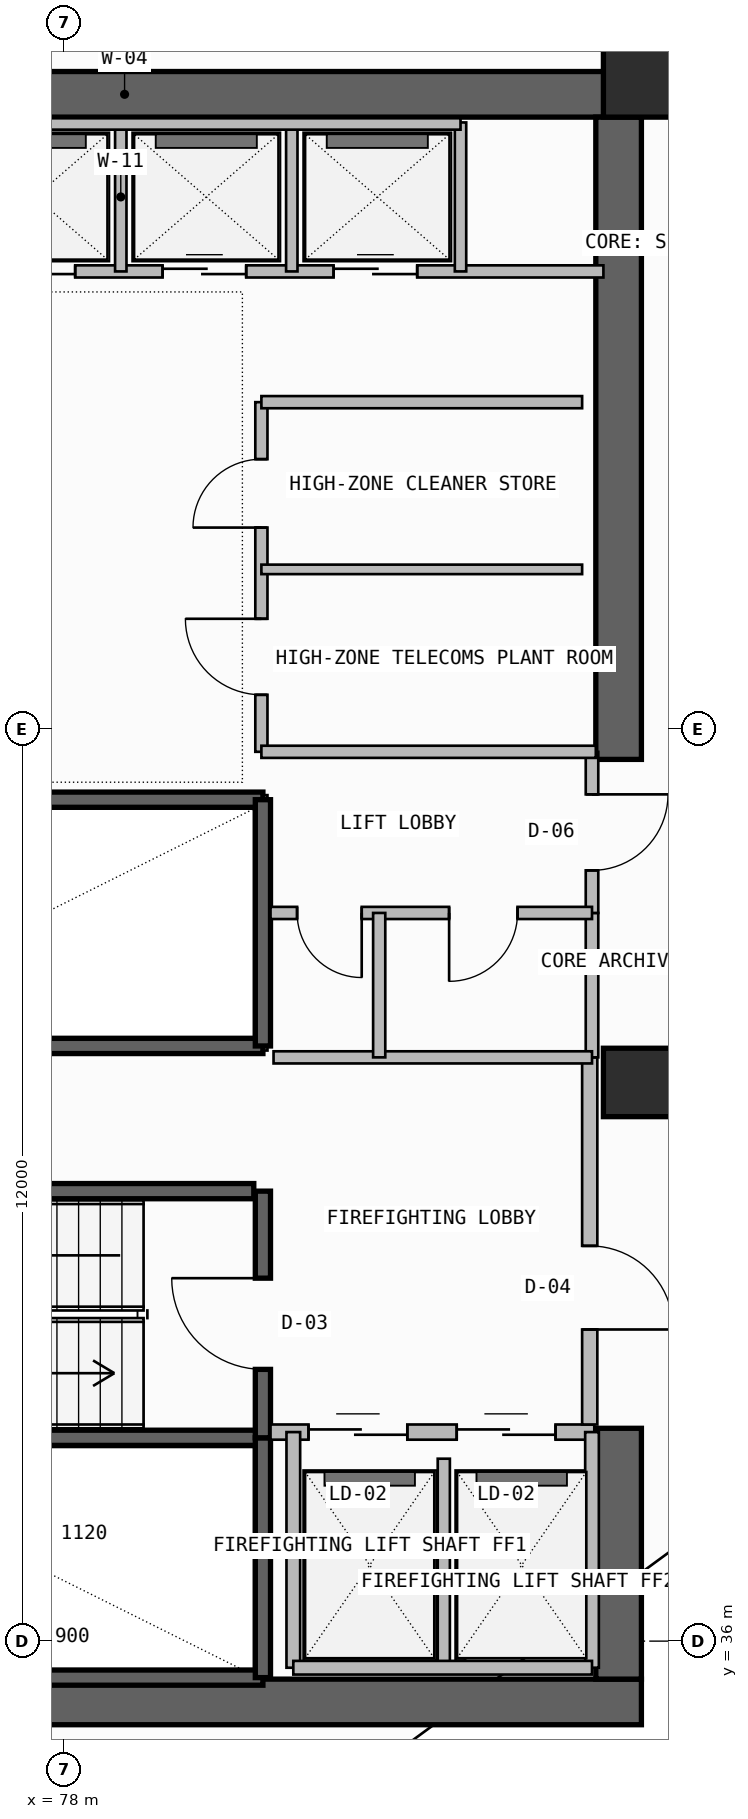
"""IFC4 building model, lengths in metres.
Left out: names, types, materials, properties, quantities, classifications, styles, units other than length and angle.
Written with IfcOpenShell. Run it as: python <this file> out.ifc"""

import sys

from ifc_helpers import new_model, si_unit, direction, frame, frame_2d, origin, origin_2d, place, context, subcontext, project, spatial, rectangle, extrude, element, fill, save


model = new_model("IFC4")
c1 = context("Model", 3, precision=1e-05, world=origin(), true_north=direction((0.0, 1.0)))
c2 = subcontext(c1, "Body", "Model", "MODEL_VIEW")
j1 = project(units=[si_unit("LENGTHUNIT", "METRE"), si_unit("PLANEANGLEUNIT", "RADIAN")], contexts=[c1])
p1 = place(None, origin())
s1 = spatial("IfcSite", under=j1, at=p1, CompositionType="ELEMENT")
p2 = place(p1, origin())
s2 = spatial("IfcBuilding", under=s1, at=p2, CompositionType="ELEMENT")
p3 = place(p2, frame((0.0, 0.0, 236.1)))
s3 = spatial("IfcBuildingStorey", under=s2, at=p3, CompositionType="ELEMENT", Elevation=236.1)
p4 = place(p3, frame((72.3, 35.2, -0.26), z_axis=(0.0, 0.0, 1.0), x_axis=(1.0, 0.0, 0.0)))
e1 = element("IfcWall", 1, at=p4, inside=s3, PredefinedType="SHEAR", context=c2, shape_type="SweptSolid", body=[
    extrude(rectangle(XDim=13.3, YDim=0.6, at=frame_2d((6.65, 0.0))), origin(), (0.0, 0.0, 1.0), 3.52),
])
p5 = place(p3, frame((85.3, 35.5, -0.26), z_axis=(0.0, 0.0, 1.0), x_axis=(0.0, 1.0, 0.0)))
e2 = element("IfcWall", 2, at=p5, inside=s3, PredefinedType="SHEAR", context=c2, shape_type="SweptSolid", body=[
    extrude(rectangle(XDim=3.3, YDim=0.6, at=frame_2d((1.65, 0.0))), origin(), (0.0, 0.0, 1.0), 3.52),
])
p6 = place(p3, frame((72.0, 56.35, -0.26), z_axis=(0.0, 0.0, 1.0), x_axis=(1.0, 0.0, 0.0)))
e3 = element("IfcWall", 3, at=p6, inside=s3, PredefinedType="SHEAR", context=c2, shape_type="SweptSolid", body=[
    extrude(rectangle(XDim=13.6, YDim=0.6, at=frame_2d((6.8, 0.0))), origin(), (0.0, 0.0, 1.0), 3.52),
])
p7 = place(p3, frame((85.3, 47.6, -0.26), z_axis=(0.0, 0.0, 1.0), x_axis=(0.0, 1.0, 0.0)))
e4 = element("IfcWall", 4, at=p7, inside=s3, PredefinedType="SHEAR", context=c2, shape_type="SweptSolid", body=[
    extrude(rectangle(XDim=8.45, YDim=0.6, at=frame_2d((4.225, 0.0))), origin(), (0.0, 0.0, 1.0), 3.52),
])
for number, where, z_axis, x_axis in (
    (5, (85.55, 43.35, 0.0), (0.0, 0.0, 1.0), (1.0, 0.0, 0.0)),
    (6, (85.55, 56.5, 0.0), (0.0, 0.0, 1.0), (1.0, 0.0, 0.0)),
):
    element("IfcColumn", number, at=place(p3, frame(where, z_axis=z_axis, x_axis=x_axis)), inside=s3, PredefinedType="COLUMN", context=c2, shape_type="SweptSolid", body=[
        extrude(rectangle(XDim=0.9, YDim=0.9, at=origin_2d()), origin(), (0.0, 0.0, 1.0), 3.52),
    ])
for number, where, z_axis, x_axis in (
    (7, (72.92, 35.52, -0.26), (0.0, 0.0, 1.0), (1.0, 0.0, 0.0)),
    (8, (72.92, 38.675, -0.26), (0.0, 0.0, 1.0), (1.0, 0.0, 0.0)),
):
    element("IfcWall", number, at=place(p3, frame(where, z_axis=z_axis, x_axis=x_axis)), inside=s3, PredefinedType="SOLIDWALL", context=c2, shape_type="SweptSolid", body=[
        extrude(rectangle(XDim=7.7, YDim=0.2, at=frame_2d((3.85, 0.0))), origin(), (0.0, 0.0, 1.0), 3.52),
    ])
p8 = place(p3, frame((80.62, 35.52, -0.26), z_axis=(0.0, 0.0, 1.0), x_axis=(0.0, 1.0, 0.0)))
e9 = element("IfcWall", 9, at=p8, inside=s3, PredefinedType="SOLIDWALL", context=c2, shape_type="SweptSolid", body=[
    extrude(rectangle(XDim=3.155, YDim=0.2, at=frame_2d((1.578, 0.0))), origin(), (0.0, 0.0, 1.0), 3.52),
])
p9 = place(p3, frame((80.62, 38.675, -0.26), z_axis=(0.0, 0.0, 1.0), x_axis=(0.0, 1.0, 0.0)))
e10 = element("IfcWall", 10, at=p9, inside=s3, PredefinedType="SOLIDWALL", context=c2, shape_type="SweptSolid", body=[
    extrude(rectangle(XDim=3.245, YDim=0.2, at=frame_2d((1.623, 0.0))), origin(), (0.0, 0.0, 1.0), 3.52),
])
p10 = place(p9, frame((0.9, 0.0, 0.26)))
e11 = element("IfcOpeningElement", 11, at=p10, cuts=e10, PredefinedType="OPENING", context=c2, shape_type="SweptSolid", body=[
    extrude(rectangle(XDim=1.2, YDim=2.2, at=frame_2d((0.6, 1.1))), frame((0.0, 0.11, 0.0), z_axis=(0.0, -1.0, 0.0), x_axis=(1.0, 0.0, 0.0)), (0.0, 0.0, 1.0), 0.22),
])
p11 = place(p3, frame((80.72, 38.75, 0.0), z_axis=(0.0, 0.0, 1.0), x_axis=(1.0, 0.0, 0.0)))
e12 = element("IfcWall", 12, at=p11, inside=s3, PredefinedType="SOLIDWALL", context=c2, shape_type="SweptSolid", body=[
    extrude(rectangle(XDim=4.26, YDim=0.2, at=frame_2d((2.13, 0.0))), origin(), (0.0, 0.0, 1.0), 3.26),
])
p12 = place(p11, frame((0.5, 0.0, 0.0)))
e13 = element("IfcOpeningElement", 13, at=p12, cuts=e12, PredefinedType="OPENING", context=c2, shape_type="SweptSolid", body=[
    extrude(rectangle(XDim=1.3, YDim=2.3, at=frame_2d((0.65, 1.15))), frame((0.0, 0.11, 0.0), z_axis=(0.0, -1.0, 0.0), x_axis=(1.0, 0.0, 0.0)), (0.0, 0.0, 1.0), 0.22),
])
p13 = place(p11, frame((2.45, 0.0, 0.0)))
e14 = element("IfcOpeningElement", 14, at=p13, cuts=e12, PredefinedType="OPENING", context=c2, shape_type="SweptSolid", body=[
    extrude(rectangle(XDim=1.3, YDim=2.3, at=frame_2d((0.65, 1.15))), frame((0.0, 0.11, 0.0), z_axis=(0.0, -1.0, 0.0), x_axis=(1.0, 0.0, 0.0)), (0.0, 0.0, 1.0), 0.22),
])
p14 = place(p3, frame((83.0, 35.65, 0.0), z_axis=(0.0, 0.0, 1.0), x_axis=(0.0, 1.0, 0.0)))
e15 = element("IfcWall", 15, at=p14, inside=s3, PredefinedType="PLUMBINGWALL", context=c2, shape_type="SweptSolid", body=[
    extrude(rectangle(XDim=2.75, YDim=0.16, at=frame_2d((1.375, 0.0))), origin(), (0.0, 0.0, 1.0), 3.26),
])
for number, where, z_axis, x_axis in (
    (16, (84.95, 35.65, 0.0), (0.0, 0.0, 1.0), (0.0, 1.0, 0.0)),
    (17, (81.02, 35.65, 0.0), (0.0, 0.0, 1.0), (0.0, 1.0, 0.0)),
):
    element("IfcWall", number, at=place(p3, frame(where, z_axis=z_axis, x_axis=x_axis)), inside=s3, PredefinedType="SOLIDWALL", context=c2, shape_type="SweptSolid", body=[
        extrude(rectangle(XDim=3.1, YDim=0.18, at=frame_2d((1.55, 0.0))), origin(), (0.0, 0.0, 1.0), 3.26),
    ])
p15 = place(p3, frame((81.02, 35.65, 0.0), z_axis=(0.0, 0.0, 1.0), x_axis=(1.0, 0.0, 0.0)))
e18 = element("IfcWall", 18, at=p15, inside=s3, PredefinedType="SOLIDWALL", context=c2, shape_type="SweptSolid", body=[
    extrude(rectangle(XDim=3.93, YDim=0.18, at=frame_2d((1.965, 0.0))), origin(), (0.0, 0.0, 1.0), 3.26),
])
p16 = place(p3, frame((84.92, 38.85, 0.0), z_axis=(0.0, 0.0, 1.0), x_axis=(0.0, 1.0, 0.0)))
e19 = element("IfcWall", 19, at=p16, inside=s3, PredefinedType="SOLIDWALL", context=c2, shape_type="SweptSolid", body=[
    extrude(rectangle(XDim=4.83, YDim=0.2, at=frame_2d((2.415, 0.0))), origin(), (0.0, 0.0, 1.0), 3.26),
])
p17 = place(p16, frame((1.25, 0.0, 0.0)))
e20 = element("IfcOpeningElement", 20, at=p17, cuts=e19, PredefinedType="OPENING", context=c2, shape_type="SweptSolid", body=[
    extrude(rectangle(XDim=1.1, YDim=2.2, at=frame_2d((0.55, 1.1))), frame((0.0, 0.11, 0.0), z_axis=(0.0, -1.0, 0.0), x_axis=(1.0, 0.0, 0.0)), (0.0, 0.0, 1.0), 0.22),
])
p18 = place(p3, frame((72.92, 41.92, -0.26), z_axis=(0.0, 0.0, 1.0), x_axis=(1.0, 0.0, 0.0)))
e21 = element("IfcWall", 21, at=p18, inside=s3, PredefinedType="SOLIDWALL", context=c2, shape_type="SweptSolid", body=[
    extrude(rectangle(XDim=7.58, YDim=0.2, at=frame_2d((3.79, 0.0))), origin(), (0.0, 0.0, 1.0), 3.52),
])
for number, where, z_axis, x_axis in (
    (22, (72.92, 43.83, -0.26), (0.0, 0.0, 1.0), (1.0, 0.0, 0.0)),
    (23, (72.92, 47.07, -0.26), (0.0, 0.0, 1.0), (1.0, 0.0, 0.0)),
):
    element("IfcWall", number, at=place(p3, frame(where, z_axis=z_axis, x_axis=x_axis)), inside=s3, PredefinedType="SOLIDWALL", context=c2, shape_type="SweptSolid", body=[
        extrude(rectangle(XDim=7.7, YDim=0.2, at=frame_2d((3.85, 0.0))), origin(), (0.0, 0.0, 1.0), 3.52),
    ])
p19 = place(p3, frame((80.62, 43.83, -0.26), z_axis=(0.0, 0.0, 1.0), x_axis=(0.0, 1.0, 0.0)))
e24 = element("IfcWall", 24, at=p19, inside=s3, PredefinedType="SOLIDWALL", context=c2, shape_type="SweptSolid", body=[
    extrude(rectangle(XDim=3.24, YDim=0.2, at=frame_2d((1.62, 0.0))), origin(), (0.0, 0.0, 1.0), 3.52),
])
p20 = place(p3, frame((84.95, 43.68, 0.0), z_axis=(0.0, 0.0, 1.0), x_axis=(0.0, 1.0, 0.0)))
e25 = element("IfcWall", 25, at=p20, inside=s3, PredefinedType="PLUMBINGWALL", context=c2, shape_type="SweptSolid", body=[
    extrude(rectangle(XDim=1.9, YDim=0.165, at=frame_2d((0.95, 0.0))), origin(), (0.0, 0.0, 1.0), 3.26),
])
p21 = place(p3, frame((84.95, 45.58, 0.0), z_axis=(0.0, 0.0, 1.0), x_axis=(0.0, 1.0, 0.0)))
e26 = element("IfcWall", 26, at=p21, inside=s3, PredefinedType="PARTITIONING", context=c2, shape_type="SweptSolid", body=[
    extrude(rectangle(XDim=2.12, YDim=0.165, at=frame_2d((1.06, 0.0))), origin(), (0.0, 0.0, 1.0), 3.26),
])
p22 = place(p21, frame((0.56, 0.0, 0.0)))
e27 = element("IfcOpeningElement", 27, at=p22, cuts=e26, PredefinedType="OPENING", context=c2, shape_type="SweptSolid", body=[
    extrude(rectangle(XDim=1.0, YDim=2.2, at=frame_2d((0.5, 1.1))), frame((0.0, 0.093, 0.0), z_axis=(0.0, -1.0, 0.0), x_axis=(1.0, 0.0, 0.0)), (0.0, 0.0, 1.0), 0.185),
])
p23 = place(p3, frame((80.72, 45.58, 0.0), z_axis=(0.0, 0.0, 1.0), x_axis=(1.0, 0.0, 0.0)))
e28 = element("IfcWall", 28, at=p23, inside=s3, PredefinedType="PLUMBINGWALL", context=c2, shape_type="SweptSolid", body=[
    extrude(rectangle(XDim=4.23, YDim=0.16, at=frame_2d((2.115, 0.0))), origin(), (0.0, 0.0, 1.0), 3.26),
])
p24 = place(p23, frame((0.35, 0.0, 0.0)))
e29 = element("IfcOpeningElement", 29, at=p24, cuts=e28, PredefinedType="OPENING", context=c2, shape_type="SweptSolid", body=[
    extrude(rectangle(XDim=0.85, YDim=2.05, at=frame_2d((0.425, 1.025))), frame((0.0, 0.09, 0.0), z_axis=(0.0, -1.0, 0.0), x_axis=(1.0, 0.0, 0.0)), (0.0, 0.0, 1.0), 0.18),
])
p25 = place(p23, frame((2.35, 0.0, 0.0)))
e30 = element("IfcOpeningElement", 30, at=p25, cuts=e28, PredefinedType="OPENING", context=c2, shape_type="SweptSolid", body=[
    extrude(rectangle(XDim=0.9, YDim=2.1, at=frame_2d((0.45, 1.05))), frame((0.0, 0.09, 0.0), z_axis=(0.0, -1.0, 0.0), x_axis=(1.0, 0.0, 0.0)), (0.0, 0.0, 1.0), 0.18),
])
p26 = place(p3, frame((80.76, 43.68, 0.0), z_axis=(0.0, 0.0, 1.0), x_axis=(1.0, 0.0, 0.0)))
e31 = element("IfcWall", 31, at=p26, inside=s3, PredefinedType="PLUMBINGWALL", context=c2, shape_type="SweptSolid", body=[
    extrude(rectangle(XDim=4.19, YDim=0.16, at=frame_2d((2.095, 0.0))), origin(), (0.0, 0.0, 1.0), 3.26),
])
p27 = place(p3, frame((82.15, 43.68, 0.0), z_axis=(0.0, 0.0, 1.0), x_axis=(0.0, 1.0, 0.0)))
e32 = element("IfcWall", 32, at=p27, inside=s3, PredefinedType="PLUMBINGWALL", context=c2, shape_type="SweptSolid", body=[
    extrude(rectangle(XDim=1.9, YDim=0.16, at=frame_2d((0.95, 0.0))), origin(), (0.0, 0.0, 1.0), 3.26),
])
p28 = place(p3, frame((80.6, 47.7, 0.0), z_axis=(0.0, 0.0, 1.0), x_axis=(0.0, 1.0, 0.0)))
e33 = element("IfcWall", 33, at=p28, inside=s3, PredefinedType="SOLIDWALL", context=c2, shape_type="SweptSolid", body=[
    extrude(rectangle(XDim=4.6, YDim=0.16, at=frame_2d((2.3, 0.0))), origin(), (0.0, 0.0, 1.0), 3.26),
])
p29 = place(p28, frame((0.75, 0.0, 0.0)))
e34 = element("IfcOpeningElement", 34, at=p29, cuts=e33, PredefinedType="OPENING", context=c2, shape_type="SweptSolid", body=[
    extrude(rectangle(XDim=1.0, YDim=2.2, at=frame_2d((0.5, 1.1))), frame((0.0, 0.09, 0.0), z_axis=(0.0, -1.0, 0.0), x_axis=(1.0, 0.0, 0.0)), (0.0, 0.0, 1.0), 0.18),
])
p30 = place(p28, frame((2.95, 0.0, 0.0)))
e35 = element("IfcOpeningElement", 35, at=p30, cuts=e33, PredefinedType="OPENING", context=c2, shape_type="SweptSolid", body=[
    extrude(rectangle(XDim=0.9, YDim=2.1, at=frame_2d((0.45, 1.05))), frame((0.0, 0.09, 0.0), z_axis=(0.0, -1.0, 0.0), x_axis=(1.0, 0.0, 0.0)), (0.0, 0.0, 1.0), 0.18),
])
p31 = place(p3, frame((80.6, 47.7, 0.0), z_axis=(0.0, 0.0, 1.0), x_axis=(1.0, 0.0, 0.0)))
e36 = element("IfcWall", 36, at=p31, inside=s3, PredefinedType="SOLIDWALL", context=c2, shape_type="SweptSolid", body=[
    extrude(rectangle(XDim=4.4, YDim=0.16, at=frame_2d((2.2, 0.0))), origin(), (0.0, 0.0, 1.0), 3.26),
])
p32 = place(p3, frame((80.6, 52.3, 0.0), z_axis=(0.0, 0.0, 1.0), x_axis=(1.0, 0.0, 0.0)))
e37 = element("IfcWall", 37, at=p32, inside=s3, PredefinedType="SOLIDWALL", context=c2, shape_type="SweptSolid", body=[
    extrude(rectangle(XDim=4.22, YDim=0.16, at=frame_2d((2.11, 0.0))), origin(), (0.0, 0.0, 1.0), 3.26),
])
p33 = place(p3, frame((80.6, 50.1, 0.0), z_axis=(0.0, 0.0, 1.0), x_axis=(1.0, 0.0, 0.0)))
e38 = element("IfcWall", 38, at=p33, inside=s3, PredefinedType="PARTITIONING", context=c2, shape_type="SweptSolid", body=[
    extrude(rectangle(XDim=4.22, YDim=0.125, at=frame_2d((2.11, 0.0))), origin(), (0.0, 0.0, 1.0), 3.26),
])
p34 = place(p3, frame((73.02, 54.02, 0.0), z_axis=(0.0, 0.0, 1.0), x_axis=(1.0, 0.0, 0.0)))
e39 = element("IfcWall", 39, at=p34, inside=s3, PredefinedType="SOLIDWALL", context=c2, shape_type="SweptSolid", body=[
    extrude(rectangle(XDim=12.08, YDim=0.16, at=frame_2d((6.04, 0.0))), origin(), (0.0, 0.0, 1.0), 3.26),
])
p35 = place(p34, frame((4.03, 0.0, 0.0)))
e40 = element("IfcOpeningElement", 40, at=p35, cuts=e39, PredefinedType="OPENING", context=c2, shape_type="SweptSolid", body=[
    extrude(rectangle(XDim=1.1, YDim=2.25, at=frame_2d((0.55, 1.125))), frame((0.0, 0.09, 0.0), z_axis=(0.0, -1.0, 0.0), x_axis=(1.0, 0.0, 0.0)), (0.0, 0.0, 1.0), 0.18),
])
p36 = place(p34, frame((6.28, 0.0, 0.0)))
e41 = element("IfcOpeningElement", 41, at=p36, cuts=e39, PredefinedType="OPENING", context=c2, shape_type="SweptSolid", body=[
    extrude(rectangle(XDim=1.1, YDim=2.25, at=frame_2d((0.55, 1.125))), frame((0.0, 0.09, 0.0), z_axis=(0.0, -1.0, 0.0), x_axis=(1.0, 0.0, 0.0)), (0.0, 0.0, 1.0), 0.18),
])
p37 = place(p34, frame((8.53, 0.0, 0.0)))
e42 = element("IfcOpeningElement", 42, at=p37, cuts=e39, PredefinedType="OPENING", context=c2, shape_type="SweptSolid", body=[
    extrude(rectangle(XDim=1.1, YDim=2.25, at=frame_2d((0.55, 1.125))), frame((0.0, 0.09, 0.0), z_axis=(0.0, -1.0, 0.0), x_axis=(1.0, 0.0, 0.0)), (0.0, 0.0, 1.0), 0.18),
])
for number, where, z_axis, x_axis in (
    (43, (78.75, 54.02, 0.0), (0.0, 0.0, 1.0), (0.0, 1.0, 0.0)),
    (44, (81.0, 54.02, 0.0), (0.0, 0.0, 1.0), (0.0, 1.0, 0.0)),
):
    element("IfcWall", number, at=place(p3, frame(where, z_axis=z_axis, x_axis=x_axis)), inside=s3, PredefinedType="PLUMBINGWALL", context=c2, shape_type="SweptSolid", body=[
        extrude(rectangle(XDim=1.96, YDim=0.15, at=frame_2d((0.98, 0.0))), origin(), (0.0, 0.0, 1.0), 3.26),
    ])
p38 = place(p3, frame((83.22, 54.02, 0.0), z_axis=(0.0, 0.0, 1.0), x_axis=(0.0, 1.0, 0.0)))
e45 = element("IfcWall", 45, at=p38, inside=s3, PredefinedType="SOLIDWALL", context=c2, shape_type="SweptSolid", body=[
    extrude(rectangle(XDim=1.96, YDim=0.15, at=frame_2d((0.98, 0.0))), origin(), (0.0, 0.0, 1.0), 3.26),
])
p39 = place(p3, frame((76.52, 55.96, 0.0), z_axis=(0.0, 0.0, 1.0), x_axis=(1.0, 0.0, 0.0)))
e46 = element("IfcWall", 46, at=p39, inside=s3, PredefinedType="SOLIDWALL", context=c2, shape_type="SweptSolid", body=[
    extrude(rectangle(XDim=6.7, YDim=0.15, at=frame_2d((3.35, 0.0))), origin(), (0.0, 0.0, 1.0), 3.26),
])
p40 = place(p10, origin())
e47 = element("IfcDoor", 47, at=p40, inside=s3, OperationType="SINGLE_SWING_RIGHT", PredefinedType="USERDEFINED", context=c2, shape_type="SweptSolid", body=[
    extrude(rectangle(XDim=1.2, YDim=2.2, at=frame_2d((0.6, 1.1))), frame((0.0, 0.025, 0.0), z_axis=(0.0, -1.0, 0.0), x_axis=(1.0, 0.0, 0.0)), (0.0, 0.0, 1.0), 0.05),
])
fill(e11, e47)
p41 = place(p12, origin())
e48 = element("IfcDoor", 48, at=p41, inside=s3, OperationType="DOUBLE_DOOR_SLIDING", PredefinedType="DOOR", context=c2, shape_type="SweptSolid", body=[
    extrude(rectangle(XDim=1.3, YDim=2.3, at=frame_2d((0.65, 1.15))), frame((0.0, 0.025, 0.0), z_axis=(0.0, -1.0, 0.0), x_axis=(1.0, 0.0, 0.0)), (0.0, 0.0, 1.0), 0.05),
])
fill(e13, e48)
p42 = place(p13, origin())
e49 = element("IfcDoor", 49, at=p42, inside=s3, OperationType="DOUBLE_DOOR_SLIDING", PredefinedType="DOOR", context=c2, shape_type="SweptSolid", body=[
    extrude(rectangle(XDim=1.3, YDim=2.3, at=frame_2d((0.65, 1.15))), frame((0.0, 0.025, 0.0), z_axis=(0.0, -1.0, 0.0), x_axis=(1.0, 0.0, 0.0)), (0.0, 0.0, 1.0), 0.05),
])
fill(e14, e49)
p43 = place(p17, frame((1.1, 0.0, 0.0), z_axis=(0.0, 0.0, 1.0), x_axis=(-1.0, 0.0, 0.0)))
e50 = element("IfcDoor", 50, at=p43, inside=s3, OperationType="SINGLE_SWING_RIGHT", PredefinedType="DOOR", context=c2, shape_type="SweptSolid", body=[
    extrude(rectangle(XDim=1.1, YDim=2.2, at=frame_2d((0.55, 1.1))), frame((0.0, 0.025, 0.0), z_axis=(0.0, -1.0, 0.0), x_axis=(1.0, 0.0, 0.0)), (0.0, 0.0, 1.0), 0.05),
])
fill(e20, e50)
p44 = place(p22, frame((1.0, 0.0, 0.0), z_axis=(0.0, 0.0, 1.0), x_axis=(-1.0, 0.0, 0.0)))
e51 = element("IfcDoor", 51, at=p44, inside=s3, OperationType="SINGLE_SWING_LEFT", PredefinedType="DOOR", context=c2, shape_type="SweptSolid", body=[
    extrude(rectangle(XDim=1.0, YDim=2.2, at=frame_2d((0.5, 1.1))), frame((0.0, 0.025, 0.0), z_axis=(0.0, -1.0, 0.0), x_axis=(1.0, 0.0, 0.0)), (0.0, 0.0, 1.0), 0.05),
])
fill(e27, e51)
p45 = place(p24, frame((0.85, 0.0, 0.0), z_axis=(0.0, 0.0, 1.0), x_axis=(-1.0, 0.0, 0.0)))
e52 = element("IfcDoor", 52, at=p45, inside=s3, OperationType="SINGLE_SWING_LEFT", PredefinedType="DOOR", context=c2, shape_type="SweptSolid", body=[
    extrude(rectangle(XDim=0.85, YDim=2.05, at=frame_2d((0.425, 1.025))), frame((0.0, 0.025, 0.0), z_axis=(0.0, -1.0, 0.0), x_axis=(1.0, 0.0, 0.0)), (0.0, 0.0, 1.0), 0.05),
])
fill(e29, e52)
p46 = place(p25, frame((0.9, 0.0, 0.0), z_axis=(0.0, 0.0, 1.0), x_axis=(-1.0, 0.0, 0.0)))
e53 = element("IfcDoor", 53, at=p46, inside=s3, OperationType="SINGLE_SWING_RIGHT", PredefinedType="DOOR", context=c2, shape_type="SweptSolid", body=[
    extrude(rectangle(XDim=0.9, YDim=2.1, at=frame_2d((0.45, 1.05))), frame((0.0, 0.025, 0.0), z_axis=(0.0, -1.0, 0.0), x_axis=(1.0, 0.0, 0.0)), (0.0, 0.0, 1.0), 0.05),
])
fill(e30, e53)
p47 = place(p29, origin())
e54 = element("IfcDoor", 54, at=p47, inside=s3, OperationType="SINGLE_SWING_RIGHT", PredefinedType="DOOR", context=c2, shape_type="SweptSolid", body=[
    extrude(rectangle(XDim=1.0, YDim=2.2, at=frame_2d((0.5, 1.1))), frame((0.0, 0.025, 0.0), z_axis=(0.0, -1.0, 0.0), x_axis=(1.0, 0.0, 0.0)), (0.0, 0.0, 1.0), 0.05),
])
fill(e34, e54)
p48 = place(p30, origin())
e55 = element("IfcDoor", 55, at=p48, inside=s3, OperationType="SINGLE_SWING_LEFT", PredefinedType="DOOR", context=c2, shape_type="SweptSolid", body=[
    extrude(rectangle(XDim=0.9, YDim=2.1, at=frame_2d((0.45, 1.05))), frame((0.0, 0.025, 0.0), z_axis=(0.0, -1.0, 0.0), x_axis=(1.0, 0.0, 0.0)), (0.0, 0.0, 1.0), 0.05),
])
fill(e35, e55)
p49 = place(p35, origin())
e56 = element("IfcDoor", 56, at=p49, inside=s3, OperationType="DOUBLE_DOOR_SLIDING", PredefinedType="DOOR", context=c2, shape_type="SweptSolid", body=[
    extrude(rectangle(XDim=1.1, YDim=2.25, at=frame_2d((0.55, 1.125))), frame((0.0, 0.025, 0.0), z_axis=(0.0, -1.0, 0.0), x_axis=(1.0, 0.0, 0.0)), (0.0, 0.0, 1.0), 0.05),
])
fill(e40, e56)
p50 = place(p36, origin())
e57 = element("IfcDoor", 57, at=p50, inside=s3, OperationType="DOUBLE_DOOR_SLIDING", PredefinedType="DOOR", context=c2, shape_type="SweptSolid", body=[
    extrude(rectangle(XDim=1.1, YDim=2.25, at=frame_2d((0.55, 1.125))), frame((0.0, 0.025, 0.0), z_axis=(0.0, -1.0, 0.0), x_axis=(1.0, 0.0, 0.0)), (0.0, 0.0, 1.0), 0.05),
])
fill(e41, e57)
p51 = place(p37, origin())
e58 = element("IfcDoor", 58, at=p51, inside=s3, OperationType="DOUBLE_DOOR_SLIDING", PredefinedType="DOOR", context=c2, shape_type="SweptSolid", body=[
    extrude(rectangle(XDim=1.1, YDim=2.25, at=frame_2d((0.55, 1.125))), frame((0.0, 0.025, 0.0), z_axis=(0.0, -1.0, 0.0), x_axis=(1.0, 0.0, 0.0)), (0.0, 0.0, 1.0), 0.05),
])
fill(e42, e58)
save(model, sys.argv[1])
